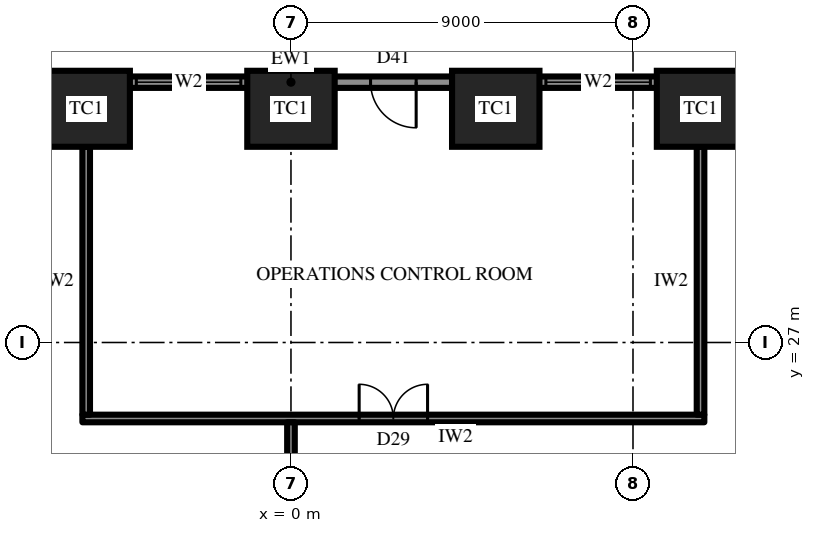
"""IFC4 building model, lengths in metres.
Left out: names, types, materials, properties, quantities, classifications, styles, units other than length and angle.
Written with IfcOpenShell. Run it as: python <this file> out.ifc"""

import sys

from ifc_helpers import new_model, si_unit, direction, frame, frame_2d, origin, origin_2d, place, context, subcontext, project, spatial, rectangle, extrude, element, fill, save


model = new_model("IFC4")
c1 = context("Model", 3, precision=1e-05, world=origin(), true_north=direction((0.0, 1.0)))
c2 = subcontext(c1, "Body", "Model", "MODEL_VIEW")
j1 = project(units=[si_unit("LENGTHUNIT", "METRE"), si_unit("PLANEANGLEUNIT", "RADIAN")], contexts=[c1])
p1 = place(None, origin())
s1 = spatial("IfcSite", under=j1, at=p1, CompositionType="ELEMENT")
p2 = place(p1, origin())
s2 = spatial("IfcBuilding", under=s1, at=p2, CompositionType="ELEMENT")
p3 = place(p2, frame((0.0, 0.0, 31.9)))
s3 = spatial("IfcBuildingStorey", under=s2, at=p3, CompositionType="ELEMENT", Elevation=31.9)
for number, where, z_axis, x_axis in (
    (1, (10.777, 33.15, 0.0), (0.0, 0.0, 1.0), (-1.0, 0.0, 0.0)),
    (2, (5.389, 33.15, 0.0), (0.0, 0.0, 1.0), (-1.0, 0.0, 0.0)),
    (3, (0.0, 33.15, 0.0), (0.0, 0.0, 1.0), (-1.0, 0.0, 0.0)),
    (4, (-5.389, 33.15, 0.0), (0.0, 0.0, 1.0), (-1.0, 0.0, 0.0)),
):
    element("IfcColumn", number, at=place(p3, frame(where, z_axis=z_axis, x_axis=x_axis)), inside=s3, PredefinedType="COLUMN", context=c2, shape_type="SweptSolid", body=[
        extrude(rectangle(XDim=2.3, YDim=2.0, at=origin_2d()), origin(), (0.0, 0.0, 1.0), 4.2),
    ])
p4 = place(p3, frame((16.166, 33.85, 0.0), z_axis=(0.0, 0.0, 1.0), x_axis=(-1.0, 0.0, 0.0)))
e5 = element("IfcWall", 5, at=p4, inside=s3, PredefinedType="SOLIDWALL", context=c2, shape_type="SweptSolid", body=[
    extrude(rectangle(XDim=32.332, YDim=0.3, at=frame_2d((16.166, 0.0))), origin(), (0.0, 0.0, 1.0), 2.7),
])
p5 = place(p4, frame((1.319, 0.0, 0.6)))
e6 = element("IfcOpeningElement", 6, at=p5, cuts=e5, PredefinedType="OPENING", context=c2, shape_type="SweptSolid", body=[
    extrude(rectangle(XDim=2.75, YDim=1.85, at=frame_2d((1.375, 0.925))), frame((0.0, 0.16, 0.0), z_axis=(0.0, -1.0, 0.0), x_axis=(1.0, 0.0, 0.0)), (0.0, 0.0, 1.0), 0.32),
])
p6 = place(p4, frame((6.708, 0.0, 0.6)))
e7 = element("IfcOpeningElement", 7, at=p6, cuts=e5, PredefinedType="OPENING", context=c2, shape_type="SweptSolid", body=[
    extrude(rectangle(XDim=2.75, YDim=1.85, at=frame_2d((1.375, 0.925))), frame((0.0, 0.16, 0.0), z_axis=(0.0, -1.0, 0.0), x_axis=(1.0, 0.0, 0.0)), (0.0, 0.0, 1.0), 0.32),
])
p7 = place(p4, frame((12.872, 0.0, 0.0)))
e8 = element("IfcOpeningElement", 8, at=p7, cuts=e5, PredefinedType="OPENING", context=c2, shape_type="SweptSolid", body=[
    extrude(rectangle(XDim=1.2, YDim=2.4, at=frame_2d((0.6, 1.2))), frame((0.0, 0.16, 0.0), z_axis=(0.0, -1.0, 0.0), x_axis=(1.0, 0.0, 0.0)), (0.0, 0.0, 1.0), 0.32),
])
p8 = place(p4, frame((17.485, 0.0, 0.6)))
e9 = element("IfcOpeningElement", 9, at=p8, cuts=e5, PredefinedType="OPENING", context=c2, shape_type="SweptSolid", body=[
    extrude(rectangle(XDim=2.75, YDim=1.85, at=frame_2d((1.375, 0.925))), frame((0.0, 0.16, 0.0), z_axis=(0.0, -1.0, 0.0), x_axis=(1.0, 0.0, 0.0)), (0.0, 0.0, 1.0), 0.32),
])
p9 = place(p4, frame((22.874, 0.0, 0.6)))
e10 = element("IfcOpeningElement", 10, at=p9, cuts=e5, PredefinedType="OPENING", context=c2, shape_type="SweptSolid", body=[
    extrude(rectangle(XDim=2.75, YDim=1.85, at=frame_2d((1.375, 0.925))), frame((0.0, 0.16, 0.0), z_axis=(0.0, -1.0, 0.0), x_axis=(1.0, 0.0, 0.0)), (0.0, 0.0, 1.0), 0.32),
])
p10 = place(p4, frame((28.262, 0.0, 0.6)))
e11 = element("IfcOpeningElement", 11, at=p10, cuts=e5, PredefinedType="OPENING", context=c2, shape_type="SweptSolid", body=[
    extrude(rectangle(XDim=2.75, YDim=1.85, at=frame_2d((1.375, 0.925))), frame((0.0, 0.16, 0.0), z_axis=(0.0, -1.0, 0.0), x_axis=(1.0, 0.0, 0.0)), (0.0, 0.0, 1.0), 0.32),
])
p11 = place(p3, frame((10.877, 25.0, 0.0), z_axis=(0.0, 0.0, 1.0), x_axis=(-1.0, 0.0, 0.0)))
e12 = element("IfcWall", 12, at=p11, inside=s3, PredefinedType="PARTITIONING", context=c2, shape_type="SweptSolid", body=[
    extrude(rectangle(XDim=16.366, YDim=0.2, at=frame_2d((8.183, 0.0))), origin(), (0.0, 0.0, 1.0), 4.0),
])
p12 = place(p11, frame((7.283, 0.0, 0.0)))
e13 = element("IfcOpeningElement", 13, at=p12, cuts=e12, PredefinedType="OPENING", context=c2, shape_type="SweptSolid", body=[
    extrude(rectangle(XDim=1.8, YDim=2.4, at=frame_2d((0.9, 1.2))), frame((0.0, 0.11, 0.0), z_axis=(0.0, -1.0, 0.0), x_axis=(1.0, 0.0, 0.0)), (0.0, 0.0, 1.0), 0.22),
])
for number, where, z_axis, x_axis in (
    (14, (10.777, 25.1, 0.0), (0.0, 0.0, 1.0), (0.0, 1.0, 0.0)),
    (15, (-5.389, 25.1, 0.0), (0.0, 0.0, 1.0), (0.0, 1.0, 0.0)),
):
    element("IfcWall", number, at=place(p3, frame(where, z_axis=z_axis, x_axis=x_axis)), inside=s3, PredefinedType="PARTITIONING", context=c2, shape_type="SweptSolid", body=[
        extrude(rectangle(XDim=7.05, YDim=0.2, at=frame_2d((3.525, 0.0))), origin(), (0.0, 0.0, 1.0), 2.944),
    ])
p13 = place(p3, frame((0.0, 18.2, 0.0), z_axis=(0.0, 0.0, 1.0), x_axis=(0.0, 1.0, 0.0)))
e16 = element("IfcWall", 16, at=p13, inside=s3, PredefinedType="PARTITIONING", context=c2, shape_type="SweptSolid", body=[
    extrude(rectangle(XDim=6.7, YDim=0.2, at=frame_2d((3.35, 0.0))), origin(), (0.0, 0.0, 1.0), 2.944),
])
p14 = place(p13, frame((0.2, 0.0, 0.0)))
e17 = element("IfcOpeningElement", 17, at=p14, cuts=e16, PredefinedType="OPENING", context=c2, shape_type="SweptSolid", body=[
    extrude(rectangle(XDim=1.0, YDim=2.2, at=frame_2d((0.5, 1.1))), frame((0.0, 0.11, 0.0), z_axis=(0.0, -1.0, 0.0), x_axis=(1.0, 0.0, 0.0)), (0.0, 0.0, 1.0), 0.22),
])
p15 = place(p6, origin())
e18 = element("IfcWindow", 18, at=p15, inside=s3, PartitioningType="SINGLE_PANEL", PredefinedType="WINDOW", context=c2, shape_type="SweptSolid", body=[
    extrude(rectangle(XDim=2.75, YDim=1.85, at=frame_2d((1.375, 0.925))), frame((0.0, 0.03, 0.0), z_axis=(0.0, -1.0, 0.0), x_axis=(1.0, 0.0, 0.0)), (0.0, 0.0, 1.0), 0.06),
])
fill(e7, e18)
p16 = place(p7, origin())
e19 = element("IfcDoor", 19, at=p16, inside=s3, OperationType="SINGLE_SWING_RIGHT", PredefinedType="DOOR", context=c2, shape_type="SweptSolid", body=[
    extrude(rectangle(XDim=1.2, YDim=2.4, at=frame_2d((0.6, 1.2))), frame((0.0, 0.025, 0.0), z_axis=(0.0, -1.0, 0.0), x_axis=(1.0, 0.0, 0.0)), (0.0, 0.0, 1.0), 0.05),
])
fill(e8, e19)
p17 = place(p8, origin())
e20 = element("IfcWindow", 20, at=p17, inside=s3, PartitioningType="SINGLE_PANEL", PredefinedType="WINDOW", context=c2, shape_type="SweptSolid", body=[
    extrude(rectangle(XDim=2.75, YDim=1.85, at=frame_2d((1.375, 0.925))), frame((0.0, 0.03, 0.0), z_axis=(0.0, -1.0, 0.0), x_axis=(1.0, 0.0, 0.0)), (0.0, 0.0, 1.0), 0.06),
])
fill(e9, e20)
p18 = place(p12, frame((1.8, 0.0, 0.0), z_axis=(0.0, 0.0, 1.0), x_axis=(-1.0, 0.0, 0.0)))
e21 = element("IfcDoor", 21, at=p18, inside=s3, OperationType="DOUBLE_DOOR_SINGLE_SWING", PredefinedType="DOOR", context=c2, shape_type="SweptSolid", body=[
    extrude(rectangle(XDim=1.8, YDim=2.4, at=frame_2d((0.9, 1.2))), frame((0.0, 0.025, 0.0), z_axis=(0.0, -1.0, 0.0), x_axis=(1.0, 0.0, 0.0)), (0.0, 0.0, 1.0), 0.05),
])
fill(e13, e21)
save(model, sys.argv[1])
